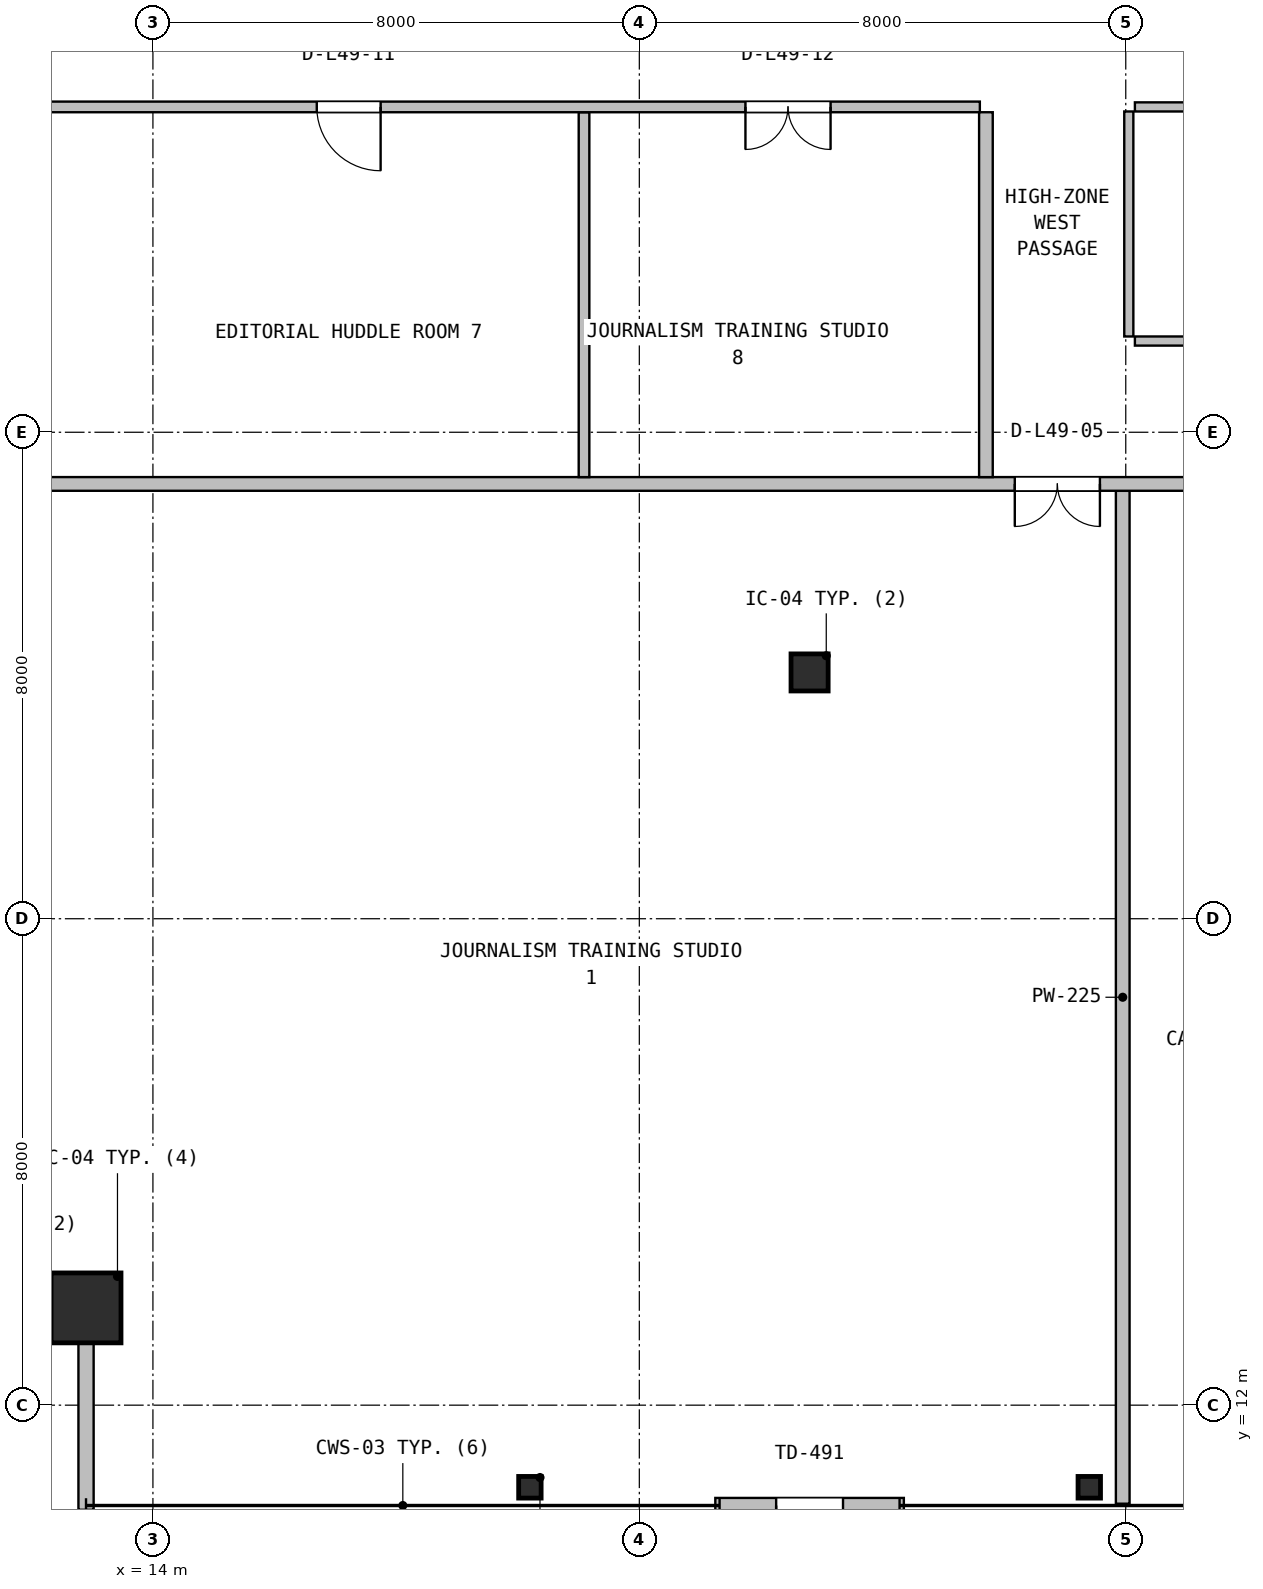
"""IFC4 building model, lengths in metres.
Left out: names, types, materials, properties, quantities, classifications, styles, units other than length and angle.
Written with IfcOpenShell. Run it as: python <this file> out.ifc"""

import sys

from ifc_helpers import new_model, si_unit, direction, frame, frame_2d, origin, origin_2d, place, context, subcontext, project, spatial, rectangle, hollow_rectangle, hollow_circle, i_section, extrude, source, transform, mapped, element, fill, save


model = new_model("IFC4")
c1 = context("Model", 3, precision=1e-05, world=origin(), true_north=direction((0.0, 1.0)))
c2 = subcontext(c1, "Body", "Model", "MODEL_VIEW")
j1 = project(units=[si_unit("LENGTHUNIT", "METRE"), si_unit("PLANEANGLEUNIT", "RADIAN")], contexts=[c1])
p1 = place(None, origin())
s1 = spatial("IfcSite", under=j1, at=p1, CompositionType="ELEMENT")
p2 = place(p1, origin())
s2 = spatial("IfcBuilding", under=s1, at=p2, CompositionType="ELEMENT")
p3 = place(p2, frame((0.0, 0.0, 199.8)))
s3 = spatial("IfcBuildingStorey", under=s2, at=p3, CompositionType="ELEMENT", Elevation=199.8)
m1 = source(origin(), c2, "Body", "SweptSolid", [
    extrude(hollow_rectangle(XDim=1.15, YDim=1.15, WallThickness=0.045, at=origin_2d()), origin(), (0.0, 0.0, 1.0), 3.8),
])
p4 = place(p3, frame((12.9, 13.6, 0.0), z_axis=(0.0, 0.0, 1.0), x_axis=(1.0, 0.0, 0.0)))
e1 = element("IfcColumn", 1, at=p4, inside=s3, PredefinedType="COLUMN", context=c2, shape_type="MappedRepresentation", body=[
    mapped(m1, transform((0.0, 0.0, 0.0), x_axis=(1.0, 0.0, 0.0), y_axis=(0.0, 1.0, 0.0), z_axis=(0.0, 0.0, 1.0), scale=1.0)),
])
m2 = source(origin(), c2, "Body", "SweptSolid", [
    extrude(i_section(OverallWidth=0.369, OverallDepth=0.356, WebThickness=0.011, FlangeThickness=0.018, FilletRadius=0.016, at=origin_2d()), origin(), (0.0, 0.0, 1.0), 3.8),
])
for number, where, z_axis, x_axis in (
    (2, (20.2, 10.65, 0.0), (0.0, 0.0, 1.0), (1.0, 0.0, 0.0)),
    (3, (29.4, 10.65, 0.0), (0.0, 0.0, 1.0), (1.0, 0.0, 0.0)),
):
    element("IfcColumn", number, at=place(p3, frame(where, z_axis=z_axis, x_axis=x_axis)), inside=s3, PredefinedType="COLUMN", context=c2, shape_type="MappedRepresentation", body=[
        mapped(m2, transform((0.0, 0.0, 0.0), x_axis=(1.0, 0.0, 0.0), y_axis=(0.0, 1.0, 0.0), z_axis=(0.0, 0.0, 1.0), scale=1.0)),
    ])
m3 = source(origin(), c2, "Body", "SweptSolid", [
    extrude(hollow_circle(Radius=0.305, WallThickness=0.025, at=origin_2d()), origin(), (0.0, 0.0, 1.0), 3.8),
])
p5 = place(p3, frame((24.8, 24.05, 0.0), z_axis=(0.0, 0.0, 1.0), x_axis=(1.0, 0.0, 0.0)))
e4 = element("IfcColumn", 4, at=p5, inside=s3, PredefinedType="COLUMN", context=c2, shape_type="MappedRepresentation", body=[
    mapped(m3, transform((0.0, 0.0, 0.0), x_axis=(1.0, 0.0, 0.0), y_axis=(0.0, 1.0, 0.0), z_axis=(0.0, 0.0, 1.0), scale=1.0)),
])
p6 = place(p3, frame((23.25, 10.35, 0.0), z_axis=(0.0, 0.0, 1.0), x_axis=(1.0, 0.0, 0.0)))
e5 = element("IfcWall", 5, at=p6, inside=s3, PredefinedType="SOLIDWALL", context=c2, shape_type="SweptSolid", body=[
    extrude(rectangle(XDim=3.1, YDim=0.25, at=frame_2d((1.55, 0.0))), origin(), (0.0, 0.0, 1.0), 3.53),
])
p7 = place(p6, frame((1.0, 0.0, 0.0)))
e6 = element("IfcOpeningElement", 6, at=p7, cuts=e5, PredefinedType="OPENING", context=c2, shape_type="SweptSolid", body=[
    extrude(rectangle(XDim=1.1, YDim=2.15, at=frame_2d((0.55, 1.075))), frame((0.0, 0.135, 0.0), z_axis=(0.0, -1.0, 0.0), x_axis=(1.0, 0.0, 0.0)), (0.0, 0.0, 1.0), 0.27),
])
p8 = place(p3, frame((12.9, 10.28, 0.0), z_axis=(0.0, 0.0, 1.0), x_axis=(0.0, 1.0, 0.0)))
e7 = element("IfcWall", 7, at=p8, inside=s3, PredefinedType="SOLIDWALL", context=c2, shape_type="SweptSolid", body=[
    extrude(rectangle(XDim=3.4, YDim=0.25, at=frame_2d((1.7, 0.0))), origin(), (0.0, 0.0, 1.0), 3.171),
])
p9 = place(p3, frame((29.95, 10.38, 0.0), z_axis=(0.0, 0.0, 1.0), x_axis=(0.0, 1.0, 0.0)))
e8 = element("IfcWall", 8, at=p9, inside=s3, PredefinedType="PARTITIONING", context=c2, shape_type="SweptSolid", body=[
    extrude(rectangle(XDim=16.657, YDim=0.225, at=frame_2d((8.329, 0.0))), origin(), (0.0, 0.0, 1.0), 2.908),
])
p10 = place(p3, frame((9.68, 27.15, 0.0), z_axis=(0.0, 0.0, 1.0), x_axis=(1.0, 0.0, 0.0)))
e9 = element("IfcWall", 9, at=p10, inside=s3, PredefinedType="PARTITIONING", context=c2, shape_type="SweptSolid", body=[
    extrude(rectangle(XDim=48.64, YDim=0.225, at=frame_2d((24.32, 0.0))), origin(), (0.0, 0.0, 1.0), 2.908),
])
p11 = place(p10, frame((18.495, 0.0, 0.0)))
e10 = element("IfcOpeningElement", 10, at=p11, cuts=e9, PredefinedType="OPENING", context=c2, shape_type="SweptSolid", body=[
    extrude(rectangle(XDim=1.4, YDim=2.12, at=frame_2d((0.7, 1.06))), frame((0.0, 0.123, 0.0), z_axis=(0.0, -1.0, 0.0), x_axis=(1.0, 0.0, 0.0)), (0.0, 0.0, 1.0), 0.245),
])
p12 = place(p10, frame((22.26, 0.0, 0.0)))
e11 = element("IfcOpeningElement", 11, at=p12, cuts=e9, PredefinedType="OPENING", context=c2, shape_type="SweptSolid", body=[
    extrude(rectangle(XDim=0.88, YDim=2.06, at=frame_2d((0.44, 1.03))), frame((0.0, 0.123, 0.0), z_axis=(0.0, -1.0, 0.0), x_axis=(1.0, 0.0, 0.0)), (0.0, 0.0, 1.0), 0.245),
])
p13 = place(p10, frame((25.865, 0.0, 0.0)))
e12 = element("IfcOpeningElement", 12, at=p13, cuts=e9, PredefinedType="OPENING", context=c2, shape_type="SweptSolid", body=[
    extrude(rectangle(XDim=0.92, YDim=2.08, at=frame_2d((0.46, 1.04))), frame((0.0, 0.123, 0.0), z_axis=(0.0, -1.0, 0.0), x_axis=(1.0, 0.0, 0.0)), (0.0, 0.0, 1.0), 0.245),
])
p14 = place(p10, frame((28.905, 0.0, 0.0)))
e13 = element("IfcOpeningElement", 13, at=p14, cuts=e9, PredefinedType="OPENING", context=c2, shape_type="SweptSolid", body=[
    extrude(rectangle(XDim=1.0, YDim=2.1, at=frame_2d((0.5, 1.05))), frame((0.0, 0.123, 0.0), z_axis=(0.0, -1.0, 0.0), x_axis=(1.0, 0.0, 0.0)), (0.0, 0.0, 1.0), 0.245),
])
p15 = place(p10, frame((32.995, 0.0, 0.0)))
e14 = element("IfcOpeningElement", 14, at=p15, cuts=e9, PredefinedType="OPENING", context=c2, shape_type="SweptSolid", body=[
    extrude(rectangle(XDim=1.05, YDim=2.1, at=frame_2d((0.525, 1.05))), frame((0.0, 0.123, 0.0), z_axis=(0.0, -1.0, 0.0), x_axis=(1.0, 0.0, 0.0)), (0.0, 0.0, 1.0), 0.245),
])
p16 = place(p10, frame((36.5, 0.0, 0.0)))
e15 = element("IfcOpeningElement", 15, at=p16, cuts=e9, PredefinedType="OPENING", context=c2, shape_type="SweptSolid", body=[
    extrude(rectangle(XDim=1.05, YDim=2.1, at=frame_2d((0.525, 1.05))), frame((0.0, 0.123, 0.0), z_axis=(0.0, -1.0, 0.0), x_axis=(1.0, 0.0, 0.0)), (0.0, 0.0, 1.0), 0.245),
])
p17 = place(p3, frame((21.09, 27.262, 0.0), z_axis=(0.0, 0.0, 1.0), x_axis=(0.0, 1.0, 0.0)))
e16 = element("IfcWall", 16, at=p17, inside=s3, PredefinedType="PARTITIONING", context=c2, shape_type="SweptSolid", body=[
    extrude(rectangle(XDim=6.001, YDim=0.175, at=frame_2d((3.0, 0.0))), origin(), (0.0, 0.0, 1.0), 3.222),
])
p18 = place(p3, frame((9.68, 33.35, 0.0), z_axis=(0.0, 0.0, 1.0), x_axis=(1.0, 0.0, 0.0)))
e17 = element("IfcWall", 17, at=p18, inside=s3, PredefinedType="PARTITIONING", context=c2, shape_type="SweptSolid", body=[
    extrude(rectangle(XDim=17.92, YDim=0.175, at=frame_2d((8.96, 0.0))), origin(), (0.0, 0.0, 1.0), 2.908),
])
p19 = place(p18, frame((7.015, 0.0, 0.0)))
e18 = element("IfcOpeningElement", 18, at=p19, cuts=e17, PredefinedType="OPENING", context=c2, shape_type="SweptSolid", body=[
    extrude(rectangle(XDim=1.05, YDim=2.1, at=frame_2d((0.525, 1.05))), frame((0.0, 0.098, 0.0), z_axis=(0.0, -1.0, 0.0), x_axis=(1.0, 0.0, 0.0)), (0.0, 0.0, 1.0), 0.195),
])
p20 = place(p18, frame((14.065, 0.0, 0.0)))
e19 = element("IfcOpeningElement", 19, at=p20, cuts=e17, PredefinedType="OPENING", context=c2, shape_type="SweptSolid", body=[
    extrude(rectangle(XDim=1.4, YDim=2.12, at=frame_2d((0.7, 1.06))), frame((0.0, 0.098, 0.0), z_axis=(0.0, -1.0, 0.0), x_axis=(1.0, 0.0, 0.0)), (0.0, 0.0, 1.0), 0.195),
])
p21 = place(p3, frame((27.7, 27.262, 0.0), z_axis=(0.0, 0.0, 1.0), x_axis=(0.0, 1.0, 0.0)))
e20 = element("IfcWall", 20, at=p21, inside=s3, PredefinedType="PARTITIONING", context=c2, shape_type="SweptSolid", body=[
    extrude(rectangle(XDim=6.001, YDim=0.225, at=frame_2d((3.0, 0.0))), origin(), (0.0, 0.0, 1.0), 3.222),
])
p22 = place(p3, frame((30.15, 29.5, 0.0), z_axis=(0.0, 0.0, 1.0), x_axis=(1.0, 0.0, 0.0)))
e21 = element("IfcWall", 21, at=p22, inside=s3, PredefinedType="PARTITIONING", context=c2, shape_type="SweptSolid", body=[
    extrude(rectangle(XDim=15.28, YDim=0.15, at=frame_2d((7.64, 0.0))), origin(), (0.0, 0.0, 1.0), 2.908),
])
p23 = place(p22, frame((7.2, 0.0, 0.0)))
e22 = element("IfcOpeningElement", 22, at=p23, cuts=e21, PredefinedType="OPENING", context=c2, shape_type="SweptSolid", body=[
    extrude(rectangle(XDim=0.88, YDim=2.06, at=frame_2d((0.44, 1.03))), frame((0.0, 0.085, 0.0), z_axis=(0.0, -1.0, 0.0), x_axis=(1.0, 0.0, 0.0)), (0.0, 0.0, 1.0), 0.17),
])
p24 = place(p3, frame((30.15, 33.35, 0.0), z_axis=(0.0, 0.0, 1.0), x_axis=(1.0, 0.0, 0.0)))
e23 = element("IfcWall", 23, at=p24, inside=s3, PredefinedType="PARTITIONING", context=c2, shape_type="SweptSolid", body=[
    extrude(rectangle(XDim=15.28, YDim=0.15, at=frame_2d((7.64, 0.0))), origin(), (0.0, 0.0, 1.0), 2.908),
])
p25 = place(p3, frame((30.05, 29.575, 0.0), z_axis=(0.0, 0.0, 1.0), x_axis=(0.0, 1.0, 0.0)))
e24 = element("IfcWall", 24, at=p25, inside=s3, PredefinedType="PARTITIONING", context=c2, shape_type="SweptSolid", body=[
    extrude(rectangle(XDim=3.7, YDim=0.15, at=frame_2d((1.85, 0.0))), origin(), (0.0, 0.0, 1.0), 3.53),
])
m4 = source(origin(), c2, "Body", "SweptSolid", [
    extrude(rectangle(XDim=1.1, YDim=2.15, at=frame_2d((0.55, 1.075))), frame((0.0, 0.025, 0.0), z_axis=(0.0, -1.0, 0.0), x_axis=(1.0, 0.0, 0.0)), (0.0, 0.0, 1.0), 0.05),
])
p26 = place(p7, frame((1.1, 0.0, 0.0), z_axis=(0.0, 0.0, 1.0), x_axis=(-1.0, 0.0, 0.0)))
e25 = element("IfcDoor", 25, at=p26, inside=s3, OperationType="SINGLE_SWING_LEFT", PredefinedType="DOOR", context=c2, shape_type="MappedRepresentation", body=[
    mapped(m4, transform((0.0, 0.0, 0.0), x_axis=(1.0, 0.0, 0.0), y_axis=(0.0, 1.0, 0.0), z_axis=(0.0, 0.0, 1.0), scale=1.0)),
])
fill(e6, e25)
m5 = source(origin(), c2, "Body", "SweptSolid", [
    extrude(rectangle(XDim=1.4, YDim=2.12, at=frame_2d((0.7, 1.06))), frame((0.0, 0.025, 0.0), z_axis=(0.0, -1.0, 0.0), x_axis=(1.0, 0.0, 0.0)), (0.0, 0.0, 1.0), 0.05),
])
p27 = place(p11, frame((1.4, 0.0, 0.0), z_axis=(0.0, 0.0, 1.0), x_axis=(-1.0, 0.0, 0.0)))
e26 = element("IfcDoor", 26, at=p27, inside=s3, OperationType="DOUBLE_DOOR_SINGLE_SWING", PredefinedType="DOOR", context=c2, shape_type="MappedRepresentation", body=[
    mapped(m5, transform((0.0, 0.0, 0.0), x_axis=(1.0, 0.0, 0.0), y_axis=(0.0, 1.0, 0.0), z_axis=(0.0, 0.0, 1.0), scale=1.0)),
])
fill(e10, e26)
m6 = source(origin(), c2, "Body", "SweptSolid", [
    extrude(rectangle(XDim=1.05, YDim=2.1, at=frame_2d((0.525, 1.05))), frame((0.0, 0.025, 0.0), z_axis=(0.0, -1.0, 0.0), x_axis=(1.0, 0.0, 0.0)), (0.0, 0.0, 1.0), 0.05),
])
p28 = place(p19, frame((1.05, 0.0, 0.0), z_axis=(0.0, 0.0, 1.0), x_axis=(-1.0, 0.0, 0.0)))
e27 = element("IfcDoor", 27, at=p28, inside=s3, OperationType="SINGLE_SWING_RIGHT", PredefinedType="DOOR", context=c2, shape_type="MappedRepresentation", body=[
    mapped(m6, transform((0.0, 0.0, 0.0), x_axis=(1.0, 0.0, 0.0), y_axis=(0.0, 1.0, 0.0), z_axis=(0.0, 0.0, 1.0), scale=1.0)),
])
fill(e18, e27)
p29 = place(p20, frame((1.4, 0.0, 0.0), z_axis=(0.0, 0.0, 1.0), x_axis=(-1.0, 0.0, 0.0)))
e28 = element("IfcDoor", 28, at=p29, inside=s3, OperationType="DOUBLE_DOOR_SINGLE_SWING", PredefinedType="DOOR", context=c2, shape_type="MappedRepresentation", body=[
    mapped(m5, transform((0.0, 0.0, 0.0), x_axis=(1.0, 0.0, 0.0), y_axis=(0.0, 1.0, 0.0), z_axis=(0.0, 0.0, 1.0), scale=1.0)),
])
fill(e19, e28)
save(model, sys.argv[1])
